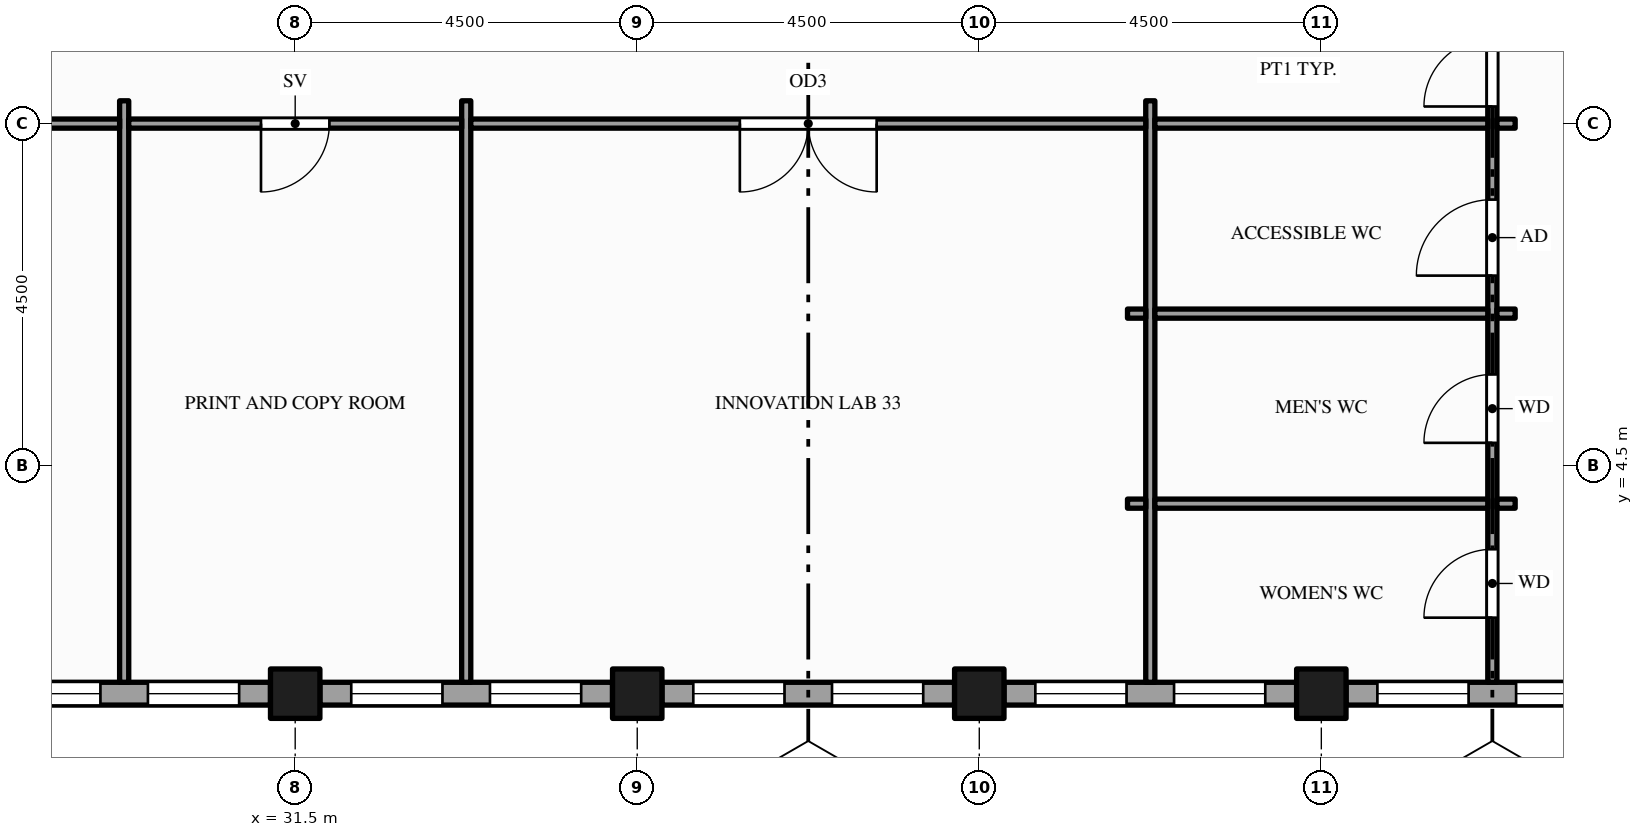
"""IFC4 building model, lengths in metres.
Left out: names, types, materials, properties, quantities, classifications, styles, units other than length and angle.
Written with IfcOpenShell. Run it as: python <this file> out.ifc"""

import sys

from ifc_helpers import new_model, si_unit, direction, frame, frame_2d, origin, origin_2d, place, context, subcontext, project, spatial, rectangle, hollow_rectangle, extrude, element, fill, save


model = new_model("IFC4")
c1 = context("Model", 3, precision=1e-05, world=origin(), true_north=direction((0.0, 1.0)))
c2 = subcontext(c1, "Body", "Model", "MODEL_VIEW")
j1 = project(units=[si_unit("LENGTHUNIT", "METRE"), si_unit("PLANEANGLEUNIT", "RADIAN")], contexts=[c1])
p1 = place(None, origin())
s1 = spatial("IfcSite", under=j1, at=p1, CompositionType="ELEMENT")
p2 = place(p1, origin())
s2 = spatial("IfcBuilding", under=s1, at=p2, CompositionType="ELEMENT")
p3 = place(p2, frame((0.0, 0.0, 293.0)))
s3 = spatial("IfcBuildingStorey", under=s2, at=p3, CompositionType="ELEMENT", Elevation=293.0)
for number, where, z_axis, x_axis in (
    (1, (31.5, 1.5, -0.15), (0.0, 0.0, 1.0), (1.0, 0.0, 0.0)),
    (2, (36.0, 1.5, -0.15), (0.0, 0.0, 1.0), (1.0, 0.0, 0.0)),
    (3, (40.5, 1.5, -0.15), (0.0, 0.0, 1.0), (1.0, 0.0, 0.0)),
    (4, (45.0, 1.5, -0.15), (0.0, 0.0, 1.0), (1.0, 0.0, 0.0)),
):
    element("IfcColumn", number, at=place(p3, frame(where, z_axis=z_axis, x_axis=x_axis)), inside=s3, PredefinedType="COLUMN", context=c2, shape_type="SweptSolid", body=[
        extrude(hollow_rectangle(XDim=0.65, YDim=0.65, WallThickness=0.032, at=origin_2d()), origin(), (0.0, 0.0, 1.0), 3.9),
    ])
p4 = place(p3, frame((27.325, 1.5, 0.0), z_axis=(0.0, 0.0, 1.0), x_axis=(1.0, 0.0, 0.0)))
e5 = element("IfcWall", 5, at=p4, inside=s3, PredefinedType="STANDARD", context=c2, shape_type="SweptSolid", body=[
    extrude(rectangle(XDim=3.85, YDim=0.3, at=frame_2d((1.925, 0.0))), origin(), (0.0, 0.0, 1.0), 2.77),
])
p5 = place(p4, frame((0.413, 0.0, 0.9)))
e6 = element("IfcOpeningElement", 6, at=p5, cuts=e5, PredefinedType="OPENING", context=c2, shape_type="SweptSolid", body=[
    extrude(rectangle(XDim=1.2, YDim=1.5, at=frame_2d((0.6, 0.75))), frame((0.0, 0.16, 0.0), z_axis=(0.0, -1.0, 0.0), x_axis=(1.0, 0.0, 0.0)), (0.0, 0.0, 1.0), 0.32),
])
p6 = place(p4, frame((2.238, 0.0, 0.9)))
e7 = element("IfcOpeningElement", 7, at=p6, cuts=e5, PredefinedType="OPENING", context=c2, shape_type="SweptSolid", body=[
    extrude(rectangle(XDim=1.2, YDim=1.5, at=frame_2d((0.6, 0.75))), frame((0.0, 0.16, 0.0), z_axis=(0.0, -1.0, 0.0), x_axis=(1.0, 0.0, 0.0)), (0.0, 0.0, 1.0), 0.32),
])
p7 = place(p3, frame((31.825, 1.5, 0.0), z_axis=(0.0, 0.0, 1.0), x_axis=(1.0, 0.0, 0.0)))
e8 = element("IfcWall", 8, at=p7, inside=s3, PredefinedType="STANDARD", context=c2, shape_type="SweptSolid", body=[
    extrude(rectangle(XDim=3.85, YDim=0.3, at=frame_2d((1.925, 0.0))), origin(), (0.0, 0.0, 1.0), 2.77),
])
p8 = place(p7, frame((0.413, 0.0, 0.9)))
e9 = element("IfcOpeningElement", 9, at=p8, cuts=e8, PredefinedType="OPENING", context=c2, shape_type="SweptSolid", body=[
    extrude(rectangle(XDim=1.2, YDim=1.5, at=frame_2d((0.6, 0.75))), frame((0.0, 0.16, 0.0), z_axis=(0.0, -1.0, 0.0), x_axis=(1.0, 0.0, 0.0)), (0.0, 0.0, 1.0), 0.32),
])
p9 = place(p7, frame((2.238, 0.0, 0.9)))
e10 = element("IfcOpeningElement", 10, at=p9, cuts=e8, PredefinedType="OPENING", context=c2, shape_type="SweptSolid", body=[
    extrude(rectangle(XDim=1.2, YDim=1.5, at=frame_2d((0.6, 0.75))), frame((0.0, 0.16, 0.0), z_axis=(0.0, -1.0, 0.0), x_axis=(1.0, 0.0, 0.0)), (0.0, 0.0, 1.0), 0.32),
])
p10 = place(p3, frame((36.325, 1.5, 0.0), z_axis=(0.0, 0.0, 1.0), x_axis=(1.0, 0.0, 0.0)))
e11 = element("IfcWall", 11, at=p10, inside=s3, PredefinedType="STANDARD", context=c2, shape_type="SweptSolid", body=[
    extrude(rectangle(XDim=3.85, YDim=0.3, at=frame_2d((1.925, 0.0))), origin(), (0.0, 0.0, 1.0), 2.77),
])
p11 = place(p10, frame((0.413, 0.0, 0.9)))
e12 = element("IfcOpeningElement", 12, at=p11, cuts=e11, PredefinedType="OPENING", context=c2, shape_type="SweptSolid", body=[
    extrude(rectangle(XDim=1.2, YDim=1.5, at=frame_2d((0.6, 0.75))), frame((0.0, 0.16, 0.0), z_axis=(0.0, -1.0, 0.0), x_axis=(1.0, 0.0, 0.0)), (0.0, 0.0, 1.0), 0.32),
])
p12 = place(p10, frame((2.238, 0.0, 0.9)))
e13 = element("IfcOpeningElement", 13, at=p12, cuts=e11, PredefinedType="OPENING", context=c2, shape_type="SweptSolid", body=[
    extrude(rectangle(XDim=1.2, YDim=1.5, at=frame_2d((0.6, 0.75))), frame((0.0, 0.16, 0.0), z_axis=(0.0, -1.0, 0.0), x_axis=(1.0, 0.0, 0.0)), (0.0, 0.0, 1.0), 0.32),
])
p13 = place(p3, frame((40.825, 1.5, 0.0), z_axis=(0.0, 0.0, 1.0), x_axis=(1.0, 0.0, 0.0)))
e14 = element("IfcWall", 14, at=p13, inside=s3, PredefinedType="STANDARD", context=c2, shape_type="SweptSolid", body=[
    extrude(rectangle(XDim=3.85, YDim=0.3, at=frame_2d((1.925, 0.0))), origin(), (0.0, 0.0, 1.0), 2.77),
])
p14 = place(p13, frame((0.413, 0.0, 0.9)))
e15 = element("IfcOpeningElement", 15, at=p14, cuts=e14, PredefinedType="OPENING", context=c2, shape_type="SweptSolid", body=[
    extrude(rectangle(XDim=1.2, YDim=1.5, at=frame_2d((0.6, 0.75))), frame((0.0, 0.16, 0.0), z_axis=(0.0, -1.0, 0.0), x_axis=(1.0, 0.0, 0.0)), (0.0, 0.0, 1.0), 0.32),
])
p15 = place(p13, frame((2.238, 0.0, 0.9)))
e16 = element("IfcOpeningElement", 16, at=p15, cuts=e14, PredefinedType="OPENING", context=c2, shape_type="SweptSolid", body=[
    extrude(rectangle(XDim=1.2, YDim=1.5, at=frame_2d((0.6, 0.75))), frame((0.0, 0.16, 0.0), z_axis=(0.0, -1.0, 0.0), x_axis=(1.0, 0.0, 0.0)), (0.0, 0.0, 1.0), 0.32),
])
p16 = place(p3, frame((45.325, 1.5, 0.0), z_axis=(0.0, 0.0, 1.0), x_axis=(1.0, 0.0, 0.0)))
e17 = element("IfcWall", 17, at=p16, inside=s3, PredefinedType="STANDARD", context=c2, shape_type="SweptSolid", body=[
    extrude(rectangle(XDim=3.85, YDim=0.3, at=frame_2d((1.925, 0.0))), origin(), (0.0, 0.0, 1.0), 2.77),
])
p17 = place(p16, frame((0.413, 0.0, 0.9)))
e18 = element("IfcOpeningElement", 18, at=p17, cuts=e17, PredefinedType="OPENING", context=c2, shape_type="SweptSolid", body=[
    extrude(rectangle(XDim=1.2, YDim=1.5, at=frame_2d((0.6, 0.75))), frame((0.0, 0.16, 0.0), z_axis=(0.0, -1.0, 0.0), x_axis=(1.0, 0.0, 0.0)), (0.0, 0.0, 1.0), 0.32),
])
p18 = place(p16, frame((2.238, 0.0, 0.9)))
e19 = element("IfcOpeningElement", 19, at=p18, cuts=e17, PredefinedType="OPENING", context=c2, shape_type="SweptSolid", body=[
    extrude(rectangle(XDim=1.2, YDim=1.5, at=frame_2d((0.6, 0.75))), frame((0.0, 0.16, 0.0), z_axis=(0.0, -1.0, 0.0), x_axis=(1.0, 0.0, 0.0)), (0.0, 0.0, 1.0), 0.32),
])
for number, where, z_axis, x_axis in (
    (20, (29.25, 1.65, 0.0), (0.0, 0.0, 1.0), (0.0, 1.0, 0.0)),
    (21, (33.75, 1.65, 0.0), (0.0, 0.0, 1.0), (0.0, 1.0, 0.0)),
    (22, (42.75, 1.65, 0.0), (0.0, 0.0, 1.0), (0.0, 1.0, 0.0)),
):
    element("IfcWall", number, at=place(p3, frame(where, z_axis=z_axis, x_axis=x_axis)), inside=s3, PredefinedType="PARTITIONING", context=c2, shape_type="SweptSolid", body=[
        extrude(rectangle(XDim=7.65, YDim=0.12, at=frame_2d((3.825, 0.0))), origin(), (0.0, 0.0, 1.0), 2.77),
    ])
p19 = place(p3, frame((47.25, 1.65, 0.0), z_axis=(0.0, 0.0, 1.0), x_axis=(0.0, 1.0, 0.0)))
e23 = element("IfcWall", 23, at=p19, inside=s3, PredefinedType="PARTITIONING", context=c2, shape_type="SweptSolid", body=[
    extrude(rectangle(XDim=22.2, YDim=0.12, at=frame_2d((11.1, 0.0))), origin(), (0.0, 0.0, 1.0), 2.77),
])
p20 = place(p19, frame((7.575, 0.0, 0.0)))
e24 = element("IfcOpeningElement", 24, at=p20, cuts=e23, PredefinedType="OPENING", context=c2, shape_type="SweptSolid", body=[
    extrude(rectangle(XDim=1.8, YDim=2.1, at=frame_2d((0.9, 1.05))), frame((0.0, 0.07, 0.0), z_axis=(0.0, -1.0, 0.0), x_axis=(1.0, 0.0, 0.0)), (0.0, 0.0, 1.0), 0.14),
])
p21 = place(p19, frame((0.85, 0.0, 0.0)))
e25 = element("IfcOpeningElement", 25, at=p21, cuts=e23, PredefinedType="OPENING", context=c2, shape_type="SweptSolid", body=[
    extrude(rectangle(XDim=0.9, YDim=2.1, at=frame_2d((0.45, 1.05))), frame((0.0, 0.07, 0.0), z_axis=(0.0, -1.0, 0.0), x_axis=(1.0, 0.0, 0.0)), (0.0, 0.0, 1.0), 0.14),
])
p22 = place(p19, frame((3.15, 0.0, 0.0)))
e26 = element("IfcOpeningElement", 26, at=p22, cuts=e23, PredefinedType="OPENING", context=c2, shape_type="SweptSolid", body=[
    extrude(rectangle(XDim=0.9, YDim=2.1, at=frame_2d((0.45, 1.05))), frame((0.0, 0.07, 0.0), z_axis=(0.0, -1.0, 0.0), x_axis=(1.0, 0.0, 0.0)), (0.0, 0.0, 1.0), 0.14),
])
p23 = place(p19, frame((5.35, 0.0, 0.0)))
e27 = element("IfcOpeningElement", 27, at=p23, cuts=e23, PredefinedType="OPENING", context=c2, shape_type="SweptSolid", body=[
    extrude(rectangle(XDim=1.0, YDim=2.1, at=frame_2d((0.5, 1.05))), frame((0.0, 0.07, 0.0), z_axis=(0.0, -1.0, 0.0), x_axis=(1.0, 0.0, 0.0)), (0.0, 0.0, 1.0), 0.14),
])
p24 = place(p3, frame((42.45, 4.0, 0.0), z_axis=(0.0, 0.0, 1.0), x_axis=(1.0, 0.0, 0.0)))
e28 = element("IfcWall", 28, at=p24, inside=s3, PredefinedType="PARTITIONING", context=c2, shape_type="SweptSolid", body=[
    extrude(rectangle(XDim=0.24, YDim=0.12, at=frame_2d((0.12, 0.0))), origin(), (0.0, 0.0, 1.0), 2.77),
])
p25 = place(p3, frame((42.81, 4.0, 0.0), z_axis=(0.0, 0.0, 1.0), x_axis=(1.0, 0.0, 0.0)))
e29 = element("IfcWall", 29, at=p25, inside=s3, PredefinedType="PARTITIONING", context=c2, shape_type="SweptSolid", body=[
    extrude(rectangle(XDim=4.38, YDim=0.12, at=frame_2d((2.19, 0.0))), origin(), (0.0, 0.0, 1.0), 2.77),
])
for number, where, z_axis, x_axis in (
    (30, (47.31, 4.0, 0.0), (0.0, 0.0, 1.0), (1.0, 0.0, 0.0)),
    (31, (42.45, 6.5, 0.0), (0.0, 0.0, 1.0), (1.0, 0.0, 0.0)),
):
    element("IfcWall", number, at=place(p3, frame(where, z_axis=z_axis, x_axis=x_axis)), inside=s3, PredefinedType="PARTITIONING", context=c2, shape_type="SweptSolid", body=[
        extrude(rectangle(XDim=0.24, YDim=0.12, at=frame_2d((0.12, 0.0))), origin(), (0.0, 0.0, 1.0), 2.77),
    ])
p26 = place(p3, frame((42.81, 6.5, 0.0), z_axis=(0.0, 0.0, 1.0), x_axis=(1.0, 0.0, 0.0)))
e32 = element("IfcWall", 32, at=p26, inside=s3, PredefinedType="PARTITIONING", context=c2, shape_type="SweptSolid", body=[
    extrude(rectangle(XDim=4.38, YDim=0.12, at=frame_2d((2.19, 0.0))), origin(), (0.0, 0.0, 1.0), 2.77),
])
p27 = place(p3, frame((47.31, 6.5, 0.0), z_axis=(0.0, 0.0, 1.0), x_axis=(1.0, 0.0, 0.0)))
e33 = element("IfcWall", 33, at=p27, inside=s3, PredefinedType="PARTITIONING", context=c2, shape_type="SweptSolid", body=[
    extrude(rectangle(XDim=0.24, YDim=0.12, at=frame_2d((0.12, 0.0))), origin(), (0.0, 0.0, 1.0), 2.77),
])
p28 = place(p3, frame((24.81, 9.0, 0.0), z_axis=(0.0, 0.0, 1.0), x_axis=(1.0, 0.0, 0.0)))
e34 = element("IfcWall", 34, at=p28, inside=s3, PredefinedType="PARTITIONING", context=c2, shape_type="SweptSolid", body=[
    extrude(rectangle(XDim=4.38, YDim=0.12, at=frame_2d((2.19, 0.0))), origin(), (0.0, 0.0, 1.0), 2.77),
])
p29 = place(p28, frame((1.59, 0.0, 0.0)))
e35 = element("IfcOpeningElement", 35, at=p29, cuts=e34, PredefinedType="OPENING", context=c2, shape_type="SweptSolid", body=[
    extrude(rectangle(XDim=1.2, YDim=2.1, at=frame_2d((0.6, 1.05))), frame((0.0, 0.07, 0.0), z_axis=(0.0, -1.0, 0.0), x_axis=(1.0, 0.0, 0.0)), (0.0, 0.0, 1.0), 0.14),
])
p30 = place(p3, frame((29.31, 9.0, 0.0), z_axis=(0.0, 0.0, 1.0), x_axis=(1.0, 0.0, 0.0)))
e36 = element("IfcWall", 36, at=p30, inside=s3, PredefinedType="PARTITIONING", context=c2, shape_type="SweptSolid", body=[
    extrude(rectangle(XDim=4.38, YDim=0.12, at=frame_2d((2.19, 0.0))), origin(), (0.0, 0.0, 1.0), 2.77),
])
p31 = place(p30, frame((1.74, 0.0, 0.0)))
e37 = element("IfcOpeningElement", 37, at=p31, cuts=e36, PredefinedType="OPENING", context=c2, shape_type="SweptSolid", body=[
    extrude(rectangle(XDim=0.9, YDim=2.1, at=frame_2d((0.45, 1.05))), frame((0.0, 0.07, 0.0), z_axis=(0.0, -1.0, 0.0), x_axis=(1.0, 0.0, 0.0)), (0.0, 0.0, 1.0), 0.14),
])
p32 = place(p3, frame((33.81, 9.0, 0.0), z_axis=(0.0, 0.0, 1.0), x_axis=(1.0, 0.0, 0.0)))
e38 = element("IfcWall", 38, at=p32, inside=s3, PredefinedType="PARTITIONING", context=c2, shape_type="SweptSolid", body=[
    extrude(rectangle(XDim=8.88, YDim=0.12, at=frame_2d((4.44, 0.0))), origin(), (0.0, 0.0, 1.0), 2.77),
])
p33 = place(p32, frame((3.54, 0.0, 0.0)))
e39 = element("IfcOpeningElement", 39, at=p33, cuts=e38, PredefinedType="OPENING", context=c2, shape_type="SweptSolid", body=[
    extrude(rectangle(XDim=1.8, YDim=2.1, at=frame_2d((0.9, 1.05))), frame((0.0, 0.07, 0.0), z_axis=(0.0, -1.0, 0.0), x_axis=(1.0, 0.0, 0.0)), (0.0, 0.0, 1.0), 0.14),
])
p34 = place(p3, frame((42.81, 9.0, 0.0), z_axis=(0.0, 0.0, 1.0), x_axis=(1.0, 0.0, 0.0)))
e40 = element("IfcWall", 40, at=p34, inside=s3, PredefinedType="PARTITIONING", context=c2, shape_type="SweptSolid", body=[
    extrude(rectangle(XDim=4.38, YDim=0.12, at=frame_2d((2.19, 0.0))), origin(), (0.0, 0.0, 1.0), 2.77),
])
p35 = place(p3, frame((47.31, 9.0, 0.0), z_axis=(0.0, 0.0, 1.0), x_axis=(1.0, 0.0, 0.0)))
e41 = element("IfcWall", 41, at=p35, inside=s3, PredefinedType="PARTITIONING", context=c2, shape_type="SweptSolid", body=[
    extrude(rectangle(XDim=0.24, YDim=0.12, at=frame_2d((0.12, 0.0))), origin(), (0.0, 0.0, 1.0), 2.77),
])
p36 = place(p5, origin())
e42 = element("IfcWindow", 42, at=p36, inside=s3, PartitioningType="SINGLE_PANEL", PredefinedType="WINDOW", context=c2, shape_type="SweptSolid", body=[
    extrude(rectangle(XDim=1.2, YDim=1.5, at=frame_2d((0.6, 0.75))), frame((0.0, 0.03, 0.0), z_axis=(0.0, -1.0, 0.0), x_axis=(1.0, 0.0, 0.0)), (0.0, 0.0, 1.0), 0.06),
])
fill(e6, e42)
p37 = place(p6, origin())
e43 = element("IfcWindow", 43, at=p37, inside=s3, PartitioningType="SINGLE_PANEL", PredefinedType="WINDOW", context=c2, shape_type="SweptSolid", body=[
    extrude(rectangle(XDim=1.2, YDim=1.5, at=frame_2d((0.6, 0.75))), frame((0.0, 0.03, 0.0), z_axis=(0.0, -1.0, 0.0), x_axis=(1.0, 0.0, 0.0)), (0.0, 0.0, 1.0), 0.06),
])
fill(e7, e43)
p38 = place(p8, origin())
e44 = element("IfcWindow", 44, at=p38, inside=s3, PartitioningType="SINGLE_PANEL", PredefinedType="WINDOW", context=c2, shape_type="SweptSolid", body=[
    extrude(rectangle(XDim=1.2, YDim=1.5, at=frame_2d((0.6, 0.75))), frame((0.0, 0.03, 0.0), z_axis=(0.0, -1.0, 0.0), x_axis=(1.0, 0.0, 0.0)), (0.0, 0.0, 1.0), 0.06),
])
fill(e9, e44)
p39 = place(p9, origin())
e45 = element("IfcWindow", 45, at=p39, inside=s3, PartitioningType="SINGLE_PANEL", PredefinedType="WINDOW", context=c2, shape_type="SweptSolid", body=[
    extrude(rectangle(XDim=1.2, YDim=1.5, at=frame_2d((0.6, 0.75))), frame((0.0, 0.03, 0.0), z_axis=(0.0, -1.0, 0.0), x_axis=(1.0, 0.0, 0.0)), (0.0, 0.0, 1.0), 0.06),
])
fill(e10, e45)
p40 = place(p11, origin())
e46 = element("IfcWindow", 46, at=p40, inside=s3, PartitioningType="SINGLE_PANEL", PredefinedType="WINDOW", context=c2, shape_type="SweptSolid", body=[
    extrude(rectangle(XDim=1.2, YDim=1.5, at=frame_2d((0.6, 0.75))), frame((0.0, 0.03, 0.0), z_axis=(0.0, -1.0, 0.0), x_axis=(1.0, 0.0, 0.0)), (0.0, 0.0, 1.0), 0.06),
])
fill(e12, e46)
p41 = place(p12, origin())
e47 = element("IfcWindow", 47, at=p41, inside=s3, PartitioningType="SINGLE_PANEL", PredefinedType="WINDOW", context=c2, shape_type="SweptSolid", body=[
    extrude(rectangle(XDim=1.2, YDim=1.5, at=frame_2d((0.6, 0.75))), frame((0.0, 0.03, 0.0), z_axis=(0.0, -1.0, 0.0), x_axis=(1.0, 0.0, 0.0)), (0.0, 0.0, 1.0), 0.06),
])
fill(e13, e47)
p42 = place(p14, origin())
e48 = element("IfcWindow", 48, at=p42, inside=s3, PartitioningType="SINGLE_PANEL", PredefinedType="WINDOW", context=c2, shape_type="SweptSolid", body=[
    extrude(rectangle(XDim=1.2, YDim=1.5, at=frame_2d((0.6, 0.75))), frame((0.0, 0.03, 0.0), z_axis=(0.0, -1.0, 0.0), x_axis=(1.0, 0.0, 0.0)), (0.0, 0.0, 1.0), 0.06),
])
fill(e15, e48)
p43 = place(p15, origin())
e49 = element("IfcWindow", 49, at=p43, inside=s3, PartitioningType="SINGLE_PANEL", PredefinedType="WINDOW", context=c2, shape_type="SweptSolid", body=[
    extrude(rectangle(XDim=1.2, YDim=1.5, at=frame_2d((0.6, 0.75))), frame((0.0, 0.03, 0.0), z_axis=(0.0, -1.0, 0.0), x_axis=(1.0, 0.0, 0.0)), (0.0, 0.0, 1.0), 0.06),
])
fill(e16, e49)
p44 = place(p17, origin())
e50 = element("IfcWindow", 50, at=p44, inside=s3, PartitioningType="SINGLE_PANEL", PredefinedType="WINDOW", context=c2, shape_type="SweptSolid", body=[
    extrude(rectangle(XDim=1.2, YDim=1.5, at=frame_2d((0.6, 0.75))), frame((0.0, 0.03, 0.0), z_axis=(0.0, -1.0, 0.0), x_axis=(1.0, 0.0, 0.0)), (0.0, 0.0, 1.0), 0.06),
])
fill(e18, e50)
p45 = place(p18, origin())
e51 = element("IfcWindow", 51, at=p45, inside=s3, PartitioningType="SINGLE_PANEL", PredefinedType="WINDOW", context=c2, shape_type="SweptSolid", body=[
    extrude(rectangle(XDim=1.2, YDim=1.5, at=frame_2d((0.6, 0.75))), frame((0.0, 0.03, 0.0), z_axis=(0.0, -1.0, 0.0), x_axis=(1.0, 0.0, 0.0)), (0.0, 0.0, 1.0), 0.06),
])
fill(e19, e51)
p46 = place(p20, origin())
e52 = element("IfcDoor", 52, at=p46, inside=s3, OperationType="DOUBLE_DOOR_SINGLE_SWING", PredefinedType="DOOR", context=c2, shape_type="SweptSolid", body=[
    extrude(rectangle(XDim=1.8, YDim=2.1, at=frame_2d((0.9, 1.05))), frame((0.0, 0.025, 0.0), z_axis=(0.0, -1.0, 0.0), x_axis=(1.0, 0.0, 0.0)), (0.0, 0.0, 1.0), 0.05),
])
fill(e24, e52)
p47 = place(p31, origin())
e53 = element("IfcDoor", 53, at=p47, inside=s3, OperationType="SINGLE_SWING_LEFT", PredefinedType="DOOR", context=c2, shape_type="SweptSolid", body=[
    extrude(rectangle(XDim=0.9, YDim=2.1, at=frame_2d((0.45, 1.05))), frame((0.0, 0.025, 0.0), z_axis=(0.0, -1.0, 0.0), x_axis=(1.0, 0.0, 0.0)), (0.0, 0.0, 1.0), 0.05),
])
fill(e37, e53)
p48 = place(p33, origin())
e54 = element("IfcDoor", 54, at=p48, inside=s3, OperationType="DOUBLE_DOOR_SINGLE_SWING", PredefinedType="DOOR", context=c2, shape_type="SweptSolid", body=[
    extrude(rectangle(XDim=1.8, YDim=2.1, at=frame_2d((0.9, 1.05))), frame((0.0, 0.025, 0.0), z_axis=(0.0, -1.0, 0.0), x_axis=(1.0, 0.0, 0.0)), (0.0, 0.0, 1.0), 0.05),
])
fill(e39, e54)
p49 = place(p21, origin())
e55 = element("IfcDoor", 55, at=p49, inside=s3, OperationType="SINGLE_SWING_LEFT", PredefinedType="DOOR", context=c2, shape_type="SweptSolid", body=[
    extrude(rectangle(XDim=0.9, YDim=2.1, at=frame_2d((0.45, 1.05))), frame((0.0, 0.025, 0.0), z_axis=(0.0, -1.0, 0.0), x_axis=(1.0, 0.0, 0.0)), (0.0, 0.0, 1.0), 0.05),
])
fill(e25, e55)
p50 = place(p22, origin())
e56 = element("IfcDoor", 56, at=p50, inside=s3, OperationType="SINGLE_SWING_LEFT", PredefinedType="DOOR", context=c2, shape_type="SweptSolid", body=[
    extrude(rectangle(XDim=0.9, YDim=2.1, at=frame_2d((0.45, 1.05))), frame((0.0, 0.025, 0.0), z_axis=(0.0, -1.0, 0.0), x_axis=(1.0, 0.0, 0.0)), (0.0, 0.0, 1.0), 0.05),
])
fill(e26, e56)
p51 = place(p23, origin())
e57 = element("IfcDoor", 57, at=p51, inside=s3, OperationType="SINGLE_SWING_LEFT", PredefinedType="DOOR", context=c2, shape_type="SweptSolid", body=[
    extrude(rectangle(XDim=1.0, YDim=2.1, at=frame_2d((0.5, 1.05))), frame((0.0, 0.025, 0.0), z_axis=(0.0, -1.0, 0.0), x_axis=(1.0, 0.0, 0.0)), (0.0, 0.0, 1.0), 0.05),
])
fill(e27, e57)
save(model, sys.argv[1])
